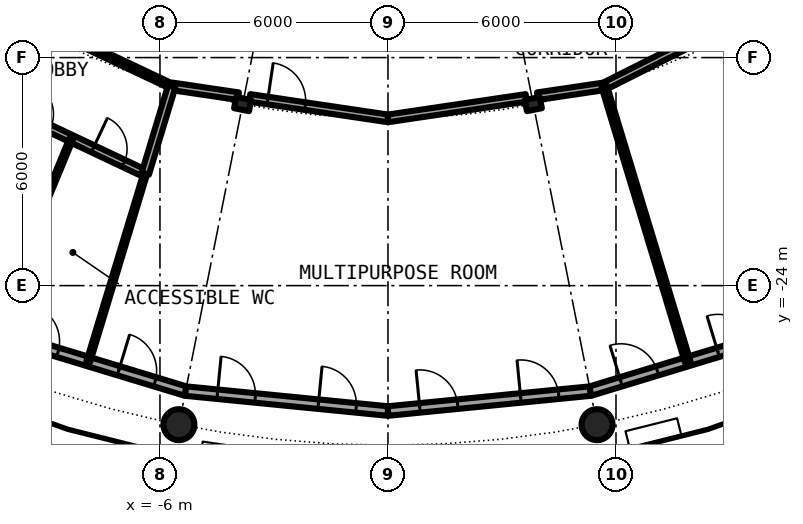
"""IFC4 building model, lengths in metres.
Left out: names, types, materials, properties, quantities, classifications, styles, units other than length and angle.
Written with IfcOpenShell. Run it as: python <this file> out.ifc"""

import sys

from ifc_helpers import new_model, si_unit, direction, frame, frame_2d, origin, origin_2d, place, context, subcontext, project, spatial, rectangle, hollow_circle, i_section, extrude, element, fill, save


model = new_model("IFC4")
c1 = context("Model", 3, precision=1e-05, world=origin(), true_north=direction((0.0, 1.0)))
c2 = subcontext(c1, "Body", "Model", "MODEL_VIEW")
j1 = project(units=[si_unit("LENGTHUNIT", "METRE"), si_unit("PLANEANGLEUNIT", "RADIAN")], contexts=[c1])
p1 = place(None, origin())
s1 = spatial("IfcSite", under=j1, at=p1, CompositionType="ELEMENT")
p2 = place(p1, origin())
s2 = spatial("IfcBuilding", under=s1, at=p2, CompositionType="ELEMENT")
p3 = place(p2, frame((0.0, 0.0, 208.5)))
s3 = spatial("IfcBuildingStorey", under=s2, at=p3, CompositionType="ELEMENT", Elevation=208.5)
for number, where, z_axis, x_axis in (
    (1, (-5.501, -27.658, 0.0), (0.0, 0.0, 1.0), (1.0, 0.0, 0.0)),
    (2, (5.501, -27.658, 0.0), (0.0, 0.0, 1.0), (1.0, 0.0, 0.0)),
):
    element("IfcColumn", number, at=place(p3, frame(where, z_axis=z_axis, x_axis=x_axis)), inside=s3, PredefinedType="COLUMN", context=c2, shape_type="SweptSolid", body=[
        extrude(hollow_circle(Radius=0.406, WallThickness=0.03, at=origin_2d()), origin(), (0.0, 0.0, 1.0), 4.2),
    ])
for number, where, z_axis, x_axis in (
    (3, (-3.824, -19.223, 0.0), (0.0, 0.0, 1.0), (-0.195, -0.981, 0.0)),
    (4, (3.824, -19.223, 0.0), (0.0, 0.0, 1.0), (0.195, -0.981, 0.0)),
):
    element("IfcColumn", number, at=place(p3, frame(where, z_axis=z_axis, x_axis=x_axis)), inside=s3, PredefinedType="COLUMN", context=c2, shape_type="SweptSolid", body=[
        extrude(i_section(OverallWidth=0.3, OverallDepth=0.4, WebThickness=0.013, FlangeThickness=0.024, FilletRadius=0.027, at=origin_2d()), origin(), (0.0, 0.0, 1.0), 4.2),
    ])
p4 = place(p3, frame((-10.447, -25.222, 0.0), z_axis=(0.0, 0.0, 1.0), x_axis=(0.956965678721, -0.290201119486, 0.0)))
e5 = element("IfcWall", 5, at=p4, inside=s3, PredefinedType="SOLIDWALL", context=c2, shape_type="SweptSolid", body=[
    extrude(rectangle(XDim=5.351, YDim=0.25, at=frame_2d((2.676, 0.0))), origin(), (0.0, 0.0, 1.0), 3.85),
])
p5 = place(p4, frame((0.841, 0.0, 0.0)))
e6 = element("IfcOpeningElement", 6, at=p5, cuts=e5, PredefinedType="OPENING", context=c2, shape_type="SweptSolid", body=[
    extrude(rectangle(XDim=1.0, YDim=2.2, at=frame_2d((0.5, 1.1))), frame((0.0, 0.135, 0.0), z_axis=(0.0, -1.0, 0.0), x_axis=(1.0, 0.0, 0.0)), (0.0, 0.0, 1.0), 0.27),
])
p6 = place(p4, frame((3.51, 0.0, 0.0)))
e7 = element("IfcOpeningElement", 7, at=p6, cuts=e5, PredefinedType="OPENING", context=c2, shape_type="SweptSolid", body=[
    extrude(rectangle(XDim=1.0, YDim=2.2, at=frame_2d((0.5, 1.1))), frame((0.0, 0.135, 0.0), z_axis=(0.0, -1.0, 0.0), x_axis=(1.0, 0.0, 0.0)), (0.0, 0.0, 1.0), 0.27),
])
p7 = place(p3, frame((-5.326, -26.775, 0.0), z_axis=(0.0, 0.0, 1.0), x_axis=(0.995173996315, -0.098126026407, 0.0)))
e8 = element("IfcWall", 8, at=p7, inside=s3, PredefinedType="SOLIDWALL", context=c2, shape_type="SweptSolid", body=[
    extrude(rectangle(XDim=5.352, YDim=0.25, at=frame_2d((2.676, 0.0))), origin(), (0.0, 0.0, 1.0), 3.85),
])
p8 = place(p7, frame((0.841, 0.0, 0.0)))
e9 = element("IfcOpeningElement", 9, at=p8, cuts=e8, PredefinedType="OPENING", context=c2, shape_type="SweptSolid", body=[
    extrude(rectangle(XDim=1.0, YDim=2.2, at=frame_2d((0.5, 1.1))), frame((0.0, 0.135, 0.0), z_axis=(0.0, -1.0, 0.0), x_axis=(1.0, 0.0, 0.0)), (0.0, 0.0, 1.0), 0.27),
])
p9 = place(p7, frame((3.51, 0.0, 0.0)))
e10 = element("IfcOpeningElement", 10, at=p9, cuts=e8, PredefinedType="OPENING", context=c2, shape_type="SweptSolid", body=[
    extrude(rectangle(XDim=1.0, YDim=2.2, at=frame_2d((0.5, 1.1))), frame((0.0, 0.135, 0.0), z_axis=(0.0, -1.0, 0.0), x_axis=(1.0, 0.0, 0.0)), (0.0, 0.0, 1.0), 0.27),
])
p10 = place(p3, frame((0.0, -27.3, 0.0), z_axis=(0.0, 0.0, 1.0), x_axis=(0.995173996315, 0.098126026407, 0.0)))
e11 = element("IfcWall", 11, at=p10, inside=s3, PredefinedType="SOLIDWALL", context=c2, shape_type="SweptSolid", body=[
    extrude(rectangle(XDim=5.352, YDim=0.25, at=frame_2d((2.676, 0.0))), origin(), (0.0, 0.0, 1.0), 3.85),
])
p11 = place(p10, frame((0.841, 0.0, 0.0)))
e12 = element("IfcOpeningElement", 12, at=p11, cuts=e11, PredefinedType="OPENING", context=c2, shape_type="SweptSolid", body=[
    extrude(rectangle(XDim=1.0, YDim=2.2, at=frame_2d((0.5, 1.1))), frame((0.0, 0.135, 0.0), z_axis=(0.0, -1.0, 0.0), x_axis=(1.0, 0.0, 0.0)), (0.0, 0.0, 1.0), 0.27),
])
p12 = place(p10, frame((3.51, 0.0, 0.0)))
e13 = element("IfcOpeningElement", 13, at=p12, cuts=e11, PredefinedType="OPENING", context=c2, shape_type="SweptSolid", body=[
    extrude(rectangle(XDim=1.0, YDim=2.2, at=frame_2d((0.5, 1.1))), frame((0.0, 0.135, 0.0), z_axis=(0.0, -1.0, 0.0), x_axis=(1.0, 0.0, 0.0)), (0.0, 0.0, 1.0), 0.27),
])
p13 = place(p3, frame((5.326, -26.775, 0.0), z_axis=(0.0, 0.0, 1.0), x_axis=(0.956965678721, 0.290201119486, 0.0)))
e14 = element("IfcWall", 14, at=p13, inside=s3, PredefinedType="SOLIDWALL", context=c2, shape_type="SweptSolid", body=[
    extrude(rectangle(XDim=5.351, YDim=0.25, at=frame_2d((2.676, 0.0))), origin(), (0.0, 0.0, 1.0), 3.85),
])
p14 = place(p13, frame((0.841, 0.0, 0.0)))
e15 = element("IfcOpeningElement", 15, at=p14, cuts=e14, PredefinedType="OPENING", context=c2, shape_type="SweptSolid", body=[
    extrude(rectangle(XDim=1.0, YDim=2.2, at=frame_2d((0.5, 1.1))), frame((0.0, 0.135, 0.0), z_axis=(0.0, -1.0, 0.0), x_axis=(1.0, 0.0, 0.0)), (0.0, 0.0, 1.0), 0.27),
])
p15 = place(p13, frame((3.51, 0.0, 0.0)))
e16 = element("IfcOpeningElement", 16, at=p15, cuts=e14, PredefinedType="OPENING", context=c2, shape_type="SweptSolid", body=[
    extrude(rectangle(XDim=1.0, YDim=2.2, at=frame_2d((0.5, 1.1))), frame((0.0, 0.135, 0.0), z_axis=(0.0, -1.0, 0.0), x_axis=(1.0, 0.0, 0.0)), (0.0, 0.0, 1.0), 0.27),
])
p16 = place(p3, frame((-12.223, -18.294, 0.0), z_axis=(0.0, 0.0, 1.0), x_axis=(0.904110764787, -0.427298168726, 0.0)))
e17 = element("IfcWall", 17, at=p16, inside=s3, PredefinedType="PARTITIONING", context=c2, shape_type="SweptSolid", body=[
    extrude(rectangle(XDim=6.459, YDim=0.2, at=frame_2d((3.229, 0.0))), origin(), (0.0, 0.0, 1.0), 3.85),
])
p17 = place(p16, frame((0.624, 0.0, 0.0)))
e18 = element("IfcOpeningElement", 18, at=p17, cuts=e17, PredefinedType="OPENING", context=c2, shape_type="SweptSolid", body=[
    extrude(rectangle(XDim=0.9, YDim=2.3, at=frame_2d((0.45, 1.15))), frame((0.0, 0.11, 0.0), z_axis=(0.0, -1.0, 0.0), x_axis=(1.0, 0.0, 0.0)), (0.0, 0.0, 1.0), 0.22),
])
p18 = place(p16, frame((2.788, 0.0, 0.0)))
e19 = element("IfcOpeningElement", 19, at=p18, cuts=e17, PredefinedType="OPENING", context=c2, shape_type="SweptSolid", body=[
    extrude(rectangle(XDim=0.9, YDim=2.3, at=frame_2d((0.45, 1.15))), frame((0.0, 0.11, 0.0), z_axis=(0.0, -1.0, 0.0), x_axis=(1.0, 0.0, 0.0)), (0.0, 0.0, 1.0), 0.22),
])
p19 = place(p16, frame((4.93, 0.0, 0.0)))
e20 = element("IfcOpeningElement", 20, at=p19, cuts=e17, PredefinedType="OPENING", context=c2, shape_type="SweptSolid", body=[
    extrude(rectangle(XDim=0.9, YDim=2.3, at=frame_2d((0.45, 1.15))), frame((0.0, 0.11, 0.0), z_axis=(0.0, -1.0, 0.0), x_axis=(1.0, 0.0, 0.0)), (0.0, 0.0, 1.0), 0.22),
])
p20 = place(p3, frame((-10.752, -16.362, 0.0), z_axis=(0.0, 0.0, 1.0), x_axis=(0.903996904196, -0.427539000798, 0.0)))
e21 = element("IfcWall", 21, at=p20, inside=s3, PredefinedType="PARTITIONING", context=c2, shape_type="SweptSolid", body=[
    extrude(rectangle(XDim=5.6, YDim=0.15, at=frame_2d((2.8, 0.0))), origin(), (0.0, 0.0, 1.0), 3.6),
])
p21 = place(p20, frame((2.224, 0.0, 0.0)))
e22 = element("IfcOpeningElement", 22, at=p21, cuts=e21, PredefinedType="OPENING", context=c2, shape_type="SweptSolid", body=[
    extrude(rectangle(XDim=1.0, YDim=2.3, at=frame_2d((0.5, 1.15))), frame((0.0, 0.085, 0.0), z_axis=(0.0, -1.0, 0.0), x_axis=(1.0, 0.0, 0.0)), (0.0, 0.0, 1.0), 0.17),
])
p22 = place(p3, frame((-5.69, -18.756, 0.0), z_axis=(0.0, 0.0, 1.0), x_axis=(0.989189411235, -0.1466434748, 0.0)))
e23 = element("IfcWall", 23, at=p22, inside=s3, PredefinedType="PARTITIONING", context=c2, shape_type="SweptSolid", body=[
    extrude(rectangle(XDim=1.773, YDim=0.2, at=frame_2d((0.887, 0.0))), origin(), (0.0, 0.0, 1.0), 3.6),
])
p23 = place(p3, frame((-3.638, -19.06, 0.0), z_axis=(0.0, 0.0, 1.0), x_axis=(0.989160650509, -0.146837350441, 0.0)))
e24 = element("IfcWall", 24, at=p23, inside=s3, PredefinedType="PARTITIONING", context=c2, shape_type="SweptSolid", body=[
    extrude(rectangle(XDim=3.678, YDim=0.2, at=frame_2d((1.839, 0.0))), origin(), (0.0, 0.0, 1.0), 3.6),
])
p24 = place(p23, frame((0.476, 0.0, 0.0)))
e25 = element("IfcOpeningElement", 25, at=p24, cuts=e24, PredefinedType="OPENING", context=c2, shape_type="SweptSolid", body=[
    extrude(rectangle(XDim=1.0, YDim=2.3, at=frame_2d((0.5, 1.15))), frame((0.0, 0.11, 0.0), z_axis=(0.0, -1.0, 0.0), x_axis=(1.0, 0.0, 0.0)), (0.0, 0.0, 1.0), 0.22),
])
p25 = place(p3, frame((0.0, -19.6, 0.0), z_axis=(0.0, 0.0, 1.0), x_axis=(0.989160650509, 0.146837350441, 0.0)))
e26 = element("IfcWall", 26, at=p25, inside=s3, PredefinedType="PARTITIONING", context=c2, shape_type="SweptSolid", body=[
    extrude(rectangle(XDim=3.678, YDim=0.2, at=frame_2d((1.839, 0.0))), origin(), (0.0, 0.0, 1.0), 3.6),
])
p26 = place(p3, frame((3.936, -19.016, 0.0), z_axis=(0.0, 0.0, 1.0), x_axis=(0.989189411235, 0.1466434748, 0.0)))
e27 = element("IfcWall", 27, at=p26, inside=s3, PredefinedType="PARTITIONING", context=c2, shape_type="SweptSolid", body=[
    extrude(rectangle(XDim=1.773, YDim=0.2, at=frame_2d((0.887, 0.0))), origin(), (0.0, 0.0, 1.0), 3.6),
])
p27 = place(p3, frame((5.69, -18.756, 0.0), z_axis=(0.0, 0.0, 1.0), x_axis=(0.893242938285, 0.449574302206, 0.0)))
e28 = element("IfcWall", 28, at=p27, inside=s3, PredefinedType="PARTITIONING", context=c2, shape_type="SweptSolid", body=[
    extrude(rectangle(XDim=5.581, YDim=0.2, at=frame_2d((2.791, 0.0))), origin(), (0.0, 0.0, 1.0), 3.6),
])
p28 = place(p27, frame((2.451, 0.0, 0.0)))
e29 = element("IfcOpeningElement", 29, at=p28, cuts=e28, PredefinedType="OPENING", context=c2, shape_type="SweptSolid", body=[
    extrude(rectangle(XDim=1.8, YDim=2.3, at=frame_2d((0.9, 1.15))), frame((0.0, 0.11, 0.0), z_axis=(0.0, -1.0, 0.0), x_axis=(1.0, 0.0, 0.0)), (0.0, 0.0, 1.0), 0.22),
])
p29 = place(p3, frame((-10.391, -25.11, 0.0), z_axis=(0.0, 0.0, 1.0), x_axis=(0.38229040446, 0.924042232075, 0.0)))
e30 = element("IfcWall", 30, at=p29, inside=s3, PredefinedType="PARTITIONING", context=c2, shape_type="SweptSolid", body=[
    extrude(rectangle(XDim=5.386, YDim=0.1, at=frame_2d((2.693, 0.0))), origin(), (0.0, 0.0, 1.0), 3.85),
])
p30 = place(p3, frame((5.69, -18.756, 0.0), z_axis=(0.0, 0.0, 1.0), x_axis=(0.29017646164, -0.956973155898, 0.0)))
e31 = element("IfcWall", 31, at=p30, inside=s3, PredefinedType="PARTITIONING", context=c2, shape_type="SweptSolid", body=[
    extrude(rectangle(XDim=7.575, YDim=0.15, at=frame_2d((3.787, 0.0))), origin(), (0.0, 0.0, 1.0), 3.85),
])
p31 = place(p3, frame((-7.887, -26.005, 0.0), z_axis=(0.0, 0.0, 1.0), x_axis=(0.290078108742, 0.95700297326, 0.0)))
e32 = element("IfcWall", 32, at=p31, inside=s3, PredefinedType="PARTITIONING", context=c2, shape_type="SweptSolid", body=[
    extrude(rectangle(XDim=5.174, YDim=0.1, at=frame_2d((2.587, 0.0))), origin(), (0.0, 0.0, 1.0), 3.85),
])
p32 = place(p3, frame((-6.386, -21.053, 0.0), z_axis=(0.0, 0.0, 1.0), x_axis=(0.290015865164, 0.957021837762, 0.0)))
e33 = element("IfcWall", 33, at=p32, inside=s3, PredefinedType="PARTITIONING", context=c2, shape_type="SweptSolid", body=[
    extrude(rectangle(XDim=2.4, YDim=0.2, at=frame_2d((1.2, 0.0))), origin(), (0.0, 0.0, 1.0), 3.85),
])
p33 = place(p5, origin())
e34 = element("IfcDoor", 34, at=p33, inside=s3, OperationType="SINGLE_SWING_LEFT", PredefinedType="DOOR", context=c2, shape_type="SweptSolid", body=[
    extrude(rectangle(XDim=1.0, YDim=2.2, at=frame_2d((0.5, 1.1))), frame((0.0, 0.025, 0.0), z_axis=(0.0, -1.0, 0.0), x_axis=(1.0, 0.0, 0.0)), (0.0, 0.0, 1.0), 0.05),
])
fill(e6, e34)
p34 = place(p6, origin())
e35 = element("IfcDoor", 35, at=p34, inside=s3, OperationType="SINGLE_SWING_LEFT", PredefinedType="DOOR", context=c2, shape_type="SweptSolid", body=[
    extrude(rectangle(XDim=1.0, YDim=2.2, at=frame_2d((0.5, 1.1))), frame((0.0, 0.025, 0.0), z_axis=(0.0, -1.0, 0.0), x_axis=(1.0, 0.0, 0.0)), (0.0, 0.0, 1.0), 0.05),
])
fill(e7, e35)
p35 = place(p8, origin())
e36 = element("IfcDoor", 36, at=p35, inside=s3, OperationType="SINGLE_SWING_LEFT", PredefinedType="DOOR", context=c2, shape_type="SweptSolid", body=[
    extrude(rectangle(XDim=1.0, YDim=2.2, at=frame_2d((0.5, 1.1))), frame((0.0, 0.025, 0.0), z_axis=(0.0, -1.0, 0.0), x_axis=(1.0, 0.0, 0.0)), (0.0, 0.0, 1.0), 0.05),
])
fill(e9, e36)
p36 = place(p9, origin())
e37 = element("IfcDoor", 37, at=p36, inside=s3, OperationType="SINGLE_SWING_LEFT", PredefinedType="DOOR", context=c2, shape_type="SweptSolid", body=[
    extrude(rectangle(XDim=1.0, YDim=2.2, at=frame_2d((0.5, 1.1))), frame((0.0, 0.025, 0.0), z_axis=(0.0, -1.0, 0.0), x_axis=(1.0, 0.0, 0.0)), (0.0, 0.0, 1.0), 0.05),
])
fill(e10, e37)
p37 = place(p11, origin())
e38 = element("IfcDoor", 38, at=p37, inside=s3, OperationType="SINGLE_SWING_LEFT", PredefinedType="DOOR", context=c2, shape_type="SweptSolid", body=[
    extrude(rectangle(XDim=1.0, YDim=2.2, at=frame_2d((0.5, 1.1))), frame((0.0, 0.025, 0.0), z_axis=(0.0, -1.0, 0.0), x_axis=(1.0, 0.0, 0.0)), (0.0, 0.0, 1.0), 0.05),
])
fill(e12, e38)
p38 = place(p12, origin())
e39 = element("IfcDoor", 39, at=p38, inside=s3, OperationType="SINGLE_SWING_LEFT", PredefinedType="DOOR", context=c2, shape_type="SweptSolid", body=[
    extrude(rectangle(XDim=1.0, YDim=2.2, at=frame_2d((0.5, 1.1))), frame((0.0, 0.025, 0.0), z_axis=(0.0, -1.0, 0.0), x_axis=(1.0, 0.0, 0.0)), (0.0, 0.0, 1.0), 0.05),
])
fill(e13, e39)
p39 = place(p14, origin())
e40 = element("IfcDoor", 40, at=p39, inside=s3, OperationType="SINGLE_SWING_LEFT", PredefinedType="DOOR", context=c2, shape_type="SweptSolid", body=[
    extrude(rectangle(XDim=1.0, YDim=2.2, at=frame_2d((0.5, 1.1))), frame((0.0, 0.025, 0.0), z_axis=(0.0, -1.0, 0.0), x_axis=(1.0, 0.0, 0.0)), (0.0, 0.0, 1.0), 0.05),
])
fill(e15, e40)
p40 = place(p15, origin())
e41 = element("IfcDoor", 41, at=p40, inside=s3, OperationType="SINGLE_SWING_LEFT", PredefinedType="DOOR", context=c2, shape_type="SweptSolid", body=[
    extrude(rectangle(XDim=1.0, YDim=2.2, at=frame_2d((0.5, 1.1))), frame((0.0, 0.025, 0.0), z_axis=(0.0, -1.0, 0.0), x_axis=(1.0, 0.0, 0.0)), (0.0, 0.0, 1.0), 0.05),
])
fill(e16, e41)
p41 = place(p19, origin())
e42 = element("IfcDoor", 42, at=p41, inside=s3, OperationType="SINGLE_SWING_RIGHT", PredefinedType="DOOR", context=c2, shape_type="SweptSolid", body=[
    extrude(rectangle(XDim=0.9, YDim=2.3, at=frame_2d((0.45, 1.15))), frame((0.0, 0.025, 0.0), z_axis=(0.0, -1.0, 0.0), x_axis=(1.0, 0.0, 0.0)), (0.0, 0.0, 1.0), 0.05),
])
fill(e20, e42)
p42 = place(p24, origin())
e43 = element("IfcDoor", 43, at=p42, inside=s3, OperationType="SINGLE_SWING_LEFT", PredefinedType="DOOR", context=c2, shape_type="SweptSolid", body=[
    extrude(rectangle(XDim=1.0, YDim=2.3, at=frame_2d((0.5, 1.15))), frame((0.0, 0.025, 0.0), z_axis=(0.0, -1.0, 0.0), x_axis=(1.0, 0.0, 0.0)), (0.0, 0.0, 1.0), 0.05),
])
fill(e25, e43)
save(model, sys.argv[1])
